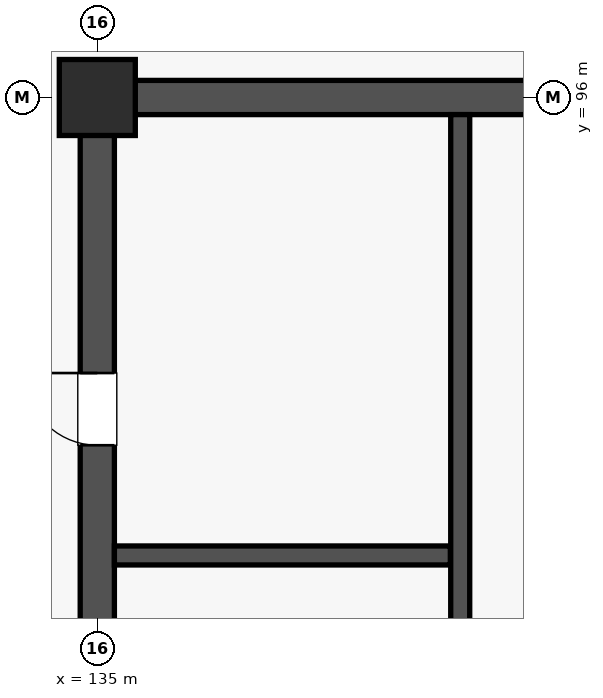
"""IFC4 building model, lengths in metres.
Left out: names, types, materials, properties, quantities, classifications, styles, units other than length and angle.
Written with IfcOpenShell. Run it as: python <this file> out.ifc"""

import sys

from ifc_helpers import new_model, si_unit, direction, frame, frame_2d, origin, origin_2d, place, context, subcontext, project, spatial, rectangle, extrude, element, fill, save


model = new_model("IFC4")
c1 = context("Model", 3, precision=1e-05, world=origin(), true_north=direction((0.0, 1.0)))
c2 = subcontext(c1, "Body", "Model", "MODEL_VIEW")
j1 = project(units=[si_unit("LENGTHUNIT", "METRE"), si_unit("PLANEANGLEUNIT", "RADIAN")], contexts=[c1])
p1 = place(None, origin())
s1 = spatial("IfcSite", under=j1, at=p1, CompositionType="ELEMENT")
p2 = place(p1, origin())
s2 = spatial("IfcBuilding", under=s1, at=p2, CompositionType="ELEMENT")
p3 = place(p2, frame((0.0, 0.0, -9.0)))
s3 = spatial("IfcBuildingStorey", under=s2, at=p3, CompositionType="ELEMENT", Elevation=-9.0)
p4 = place(p3, frame((135.0, 96.0, 0.0), z_axis=(0.0, 0.0, 1.0), x_axis=(1.0, 0.0, 0.0)))
e1 = element("IfcColumn", 1, at=p4, inside=s3, PredefinedType="COLUMN", context=c2, shape_type="SweptSolid", body=[
    extrude(rectangle(XDim=1.0, YDim=1.0, at=origin_2d()), origin(), (0.0, 0.0, 1.0), 4.5),
])
p5 = place(p3, frame((135.225, 96.0, 0.0), z_axis=(0.0, 0.0, 1.0), x_axis=(1.0, 0.0, 0.0)))
e2 = element("IfcWall", 2, at=p5, inside=s3, PredefinedType="SHEAR", context=c2, shape_type="SweptSolid", body=[
    extrude(rectangle(XDim=8.55, YDim=0.45, at=frame_2d((4.275, 0.0))), origin(), (0.0, 0.0, 1.0), 4.2),
])
p6 = place(p3, frame((135.0, 80.225, 0.0), z_axis=(0.0, 0.0, 1.0), x_axis=(0.0, 1.0, 0.0)))
e3 = element("IfcWall", 3, at=p6, inside=s3, PredefinedType="SHEAR", context=c2, shape_type="SweptSolid", body=[
    extrude(rectangle(XDim=15.55, YDim=0.45, at=frame_2d((7.775, 0.0))), origin(), (0.0, 0.0, 1.0), 4.2),
])
p7 = place(p6, frame((11.2, 0.0, 0.0)))
e4 = element("IfcOpeningElement", 4, at=p7, cuts=e3, PredefinedType="OPENING", context=c2, shape_type="SweptSolid", body=[
    extrude(rectangle(XDim=0.95, YDim=2.1, at=frame_2d((0.475, 1.05))), frame((0.0, 0.237, 0.0), z_axis=(0.0, -1.0, 0.0), x_axis=(1.0, 0.0, 0.0)), (0.0, 0.0, 1.0), 0.474),
])
p8 = place(p3, frame((139.775, 80.225, 0.0), z_axis=(0.0, 0.0, 1.0), x_axis=(0.0, 1.0, 0.0)))
e5 = element("IfcWall", 5, at=p8, inside=s3, PredefinedType="SOLIDWALL", context=c2, shape_type="SweptSolid", body=[
    extrude(rectangle(XDim=15.55, YDim=0.25, at=frame_2d((7.775, 0.0))), origin(), (0.0, 0.0, 1.0), 4.2),
])
p9 = place(p8, frame((0.45, 0.0, 0.0)))
e6 = element("IfcOpeningElement", 6, at=p9, cuts=e5, PredefinedType="OPENING", context=c2, shape_type="SweptSolid", body=[
    extrude(rectangle(XDim=1.1, YDim=2.15, at=frame_2d((0.55, 1.075))), frame((0.0, 0.137, 0.0), z_axis=(0.0, -1.0, 0.0), x_axis=(1.0, 0.0, 0.0)), (0.0, 0.0, 1.0), 0.274),
])
p10 = place(p3, frame((135.225, 89.975, 0.0), z_axis=(0.0, 0.0, 1.0), x_axis=(1.0, 0.0, 0.0)))
e7 = element("IfcWall", 7, at=p10, inside=s3, PredefinedType="SOLIDWALL", context=c2, shape_type="SweptSolid", body=[
    extrude(rectangle(XDim=4.42, YDim=0.25, at=frame_2d((2.21, 0.0))), origin(), (0.0, 0.0, 1.0), 4.2),
])
p11 = place(p7, origin())
e8 = element("IfcDoor", 8, at=p11, inside=s3, OperationType="SINGLE_SWING_RIGHT", PredefinedType="DOOR", context=c2, shape_type="SweptSolid", body=[
    extrude(rectangle(XDim=0.95, YDim=2.1, at=frame_2d((0.475, 1.05))), frame((0.0, 0.025, 0.0), z_axis=(0.0, -1.0, 0.0), x_axis=(1.0, 0.0, 0.0)), (0.0, 0.0, 1.0), 0.05),
])
fill(e4, e8)
save(model, sys.argv[1])
